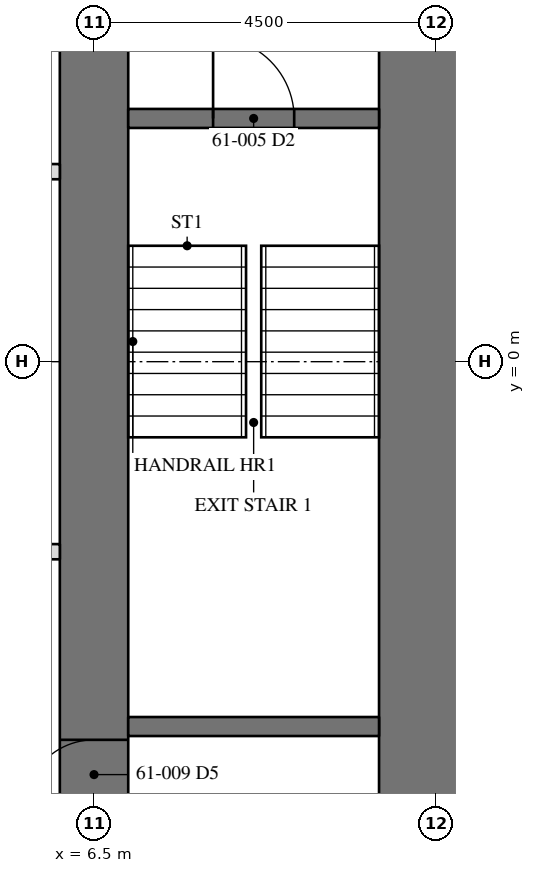
"""IFC4 building model, lengths in metres.
Left out: names, types, materials, properties, quantities, classifications, styles, units other than length and angle.
Written with IfcOpenShell. Run it as: python <this file> out.ifc"""

import sys

from ifc_helpers import new_model, si_unit, direction, frame, frame_2d, origin, place, context, subcontext, project, spatial, rectangle, extrude, element, fill, save


model = new_model("IFC4")
c1 = context("Model", 3, precision=1e-05, world=origin(), true_north=direction((0.0, 1.0)))
c2 = subcontext(c1, "Body", "Model", "MODEL_VIEW")
j1 = project(units=[si_unit("LENGTHUNIT", "METRE"), si_unit("PLANEANGLEUNIT", "RADIAN")], contexts=[c1])
p1 = place(None, origin())
s1 = spatial("IfcSite", under=j1, at=p1, CompositionType="ELEMENT")
p2 = place(p1, origin())
s2 = spatial("IfcBuilding", under=s1, at=p2, CompositionType="ELEMENT")
p3 = place(p2, frame((0.0, 0.0, 250.2)))
s3 = spatial("IfcBuildingStorey", under=s2, at=p3, CompositionType="ELEMENT", Elevation=250.2)
p4 = place(p3, frame((11.0, -11.0, 0.0), z_axis=(0.0, 0.0, 1.0), x_axis=(0.0, 1.0, 0.0)))
e1 = element("IfcWall", 1, at=p4, inside=s3, PredefinedType="SHEAR", context=c2, shape_type="SweptSolid", body=[
    extrude(rectangle(XDim=22.0, YDim=1.5, at=frame_2d((11.0, 0.0))), origin(), (0.0, 0.0, 1.0), 3.5),
])
p5 = place(p4, frame((15.393, 0.0, 0.0)))
e2 = element("IfcOpeningElement", 2, at=p5, cuts=e1, PredefinedType="OPENING", context=c2, shape_type="SweptSolid", body=[
    extrude(rectangle(XDim=0.915, YDim=2.134, at=frame_2d((0.458, 1.067))), frame((0.0, 0.76, 0.0), z_axis=(0.0, -1.0, 0.0), x_axis=(1.0, 0.0, 0.0)), (0.0, 0.0, 1.0), 1.52),
])
p6 = place(p3, frame((6.5, -6.5, 0.0), z_axis=(0.0, 0.0, 1.0), x_axis=(0.0, 1.0, 0.0)))
e3 = element("IfcWall", 3, at=p6, inside=s3, PredefinedType="SHEAR", context=c2, shape_type="SweptSolid", body=[
    extrude(rectangle(XDim=13.0, YDim=0.9, at=frame_2d((6.5, 0.0))), origin(), (0.0, 0.0, 1.0), 3.5),
])
p7 = place(p6, frame((10.893, 0.0, 0.0)))
e4 = element("IfcOpeningElement", 4, at=p7, cuts=e3, PredefinedType="OPENING", context=c2, shape_type="SweptSolid", body=[
    extrude(rectangle(XDim=0.915, YDim=2.134, at=frame_2d((0.458, 1.067))), frame((0.0, 0.46, 0.0), z_axis=(0.0, -1.0, 0.0), x_axis=(1.0, 0.0, 0.0)), (0.0, 0.0, 1.0), 0.92),
])
p8 = place(p6, frame((0.61, 0.0, 0.0)))
e5 = element("IfcOpeningElement", 5, at=p8, cuts=e3, PredefinedType="OPENING", context=c2, shape_type="SweptSolid", body=[
    extrude(rectangle(XDim=0.915, YDim=2.134, at=frame_2d((0.458, 1.067))), frame((0.0, 0.46, 0.0), z_axis=(0.0, -1.0, 0.0), x_axis=(1.0, 0.0, 0.0)), (0.0, 0.0, 1.0), 0.92),
])
p9 = place(p3, frame((6.95, -4.8, 0.0), z_axis=(0.0, 0.0, 1.0), x_axis=(1.0, 0.0, 0.0)))
e6 = element("IfcWall", 6, at=p9, inside=s3, PredefinedType="SOLIDWALL", context=c2, shape_type="SweptSolid", body=[
    extrude(rectangle(XDim=3.3, YDim=0.25, at=frame_2d((1.65, 0.0))), origin(), (0.0, 0.0, 1.0), 3.31),
])
p10 = place(p3, frame((6.95, 3.2, 0.0), z_axis=(0.0, 0.0, 1.0), x_axis=(1.0, 0.0, 0.0)))
e7 = element("IfcWall", 7, at=p10, inside=s3, PredefinedType="SOLIDWALL", context=c2, shape_type="SweptSolid", body=[
    extrude(rectangle(XDim=3.3, YDim=0.25, at=frame_2d((1.65, 0.0))), origin(), (0.0, 0.0, 1.0), 3.31),
])
p11 = place(p10, frame((1.116, 0.0, 0.0)))
e8 = element("IfcOpeningElement", 8, at=p11, cuts=e7, PredefinedType="OPENING", context=c2, shape_type="SweptSolid", body=[
    extrude(rectangle(XDim=1.067, YDim=2.134, at=frame_2d((0.533, 1.067))), frame((0.0, 0.135, 0.0), z_axis=(0.0, -1.0, 0.0), x_axis=(1.0, 0.0, 0.0)), (0.0, 0.0, 1.0), 0.27),
])
for number, where, z_axis, x_axis in (
    (9, (-6.05, 2.5, 0.0), (0.0, 0.0, 1.0), (1.0, 0.0, 0.0)),
    (10, (6.05, -2.5, 0.0), (0.0, 0.0, 1.0), (-1.0, 0.0, 0.0)),
):
    element("IfcWall", number, at=place(p3, frame(where, z_axis=z_axis, x_axis=x_axis)), inside=s3, PredefinedType="PARTITIONING", context=c2, shape_type="SweptSolid", body=[
        extrude(rectangle(XDim=12.1, YDim=0.2, at=frame_2d((6.05, 0.0))), origin(), (0.0, 0.0, 1.0), 3.31),
    ])
p12 = place(p11, origin())
e11 = element("IfcDoor", 11, at=p12, inside=s3, OperationType="SINGLE_SWING_LEFT", PredefinedType="DOOR", context=c2, shape_type="SweptSolid", body=[
    extrude(rectangle(XDim=1.067, YDim=2.134, at=frame_2d((0.533, 1.067))), frame((0.0, 0.025, 0.0), z_axis=(0.0, -1.0, 0.0), x_axis=(1.0, 0.0, 0.0)), (0.0, 0.0, 1.0), 0.05),
])
fill(e8, e11)
p13 = place(p8, origin())
e12 = element("IfcDoor", 12, at=p13, inside=s3, OperationType="SINGLE_SWING_RIGHT", PredefinedType="DOOR", context=c2, shape_type="SweptSolid", body=[
    extrude(rectangle(XDim=0.915, YDim=2.134, at=frame_2d((0.458, 1.067))), frame((0.0, -0.375, 0.0), z_axis=(0.0, -1.0, 0.0), x_axis=(1.0, 0.0, 0.0)), (0.0, 0.0, 1.0), 0.05),
])
fill(e5, e12)
save(model, sys.argv[1])
